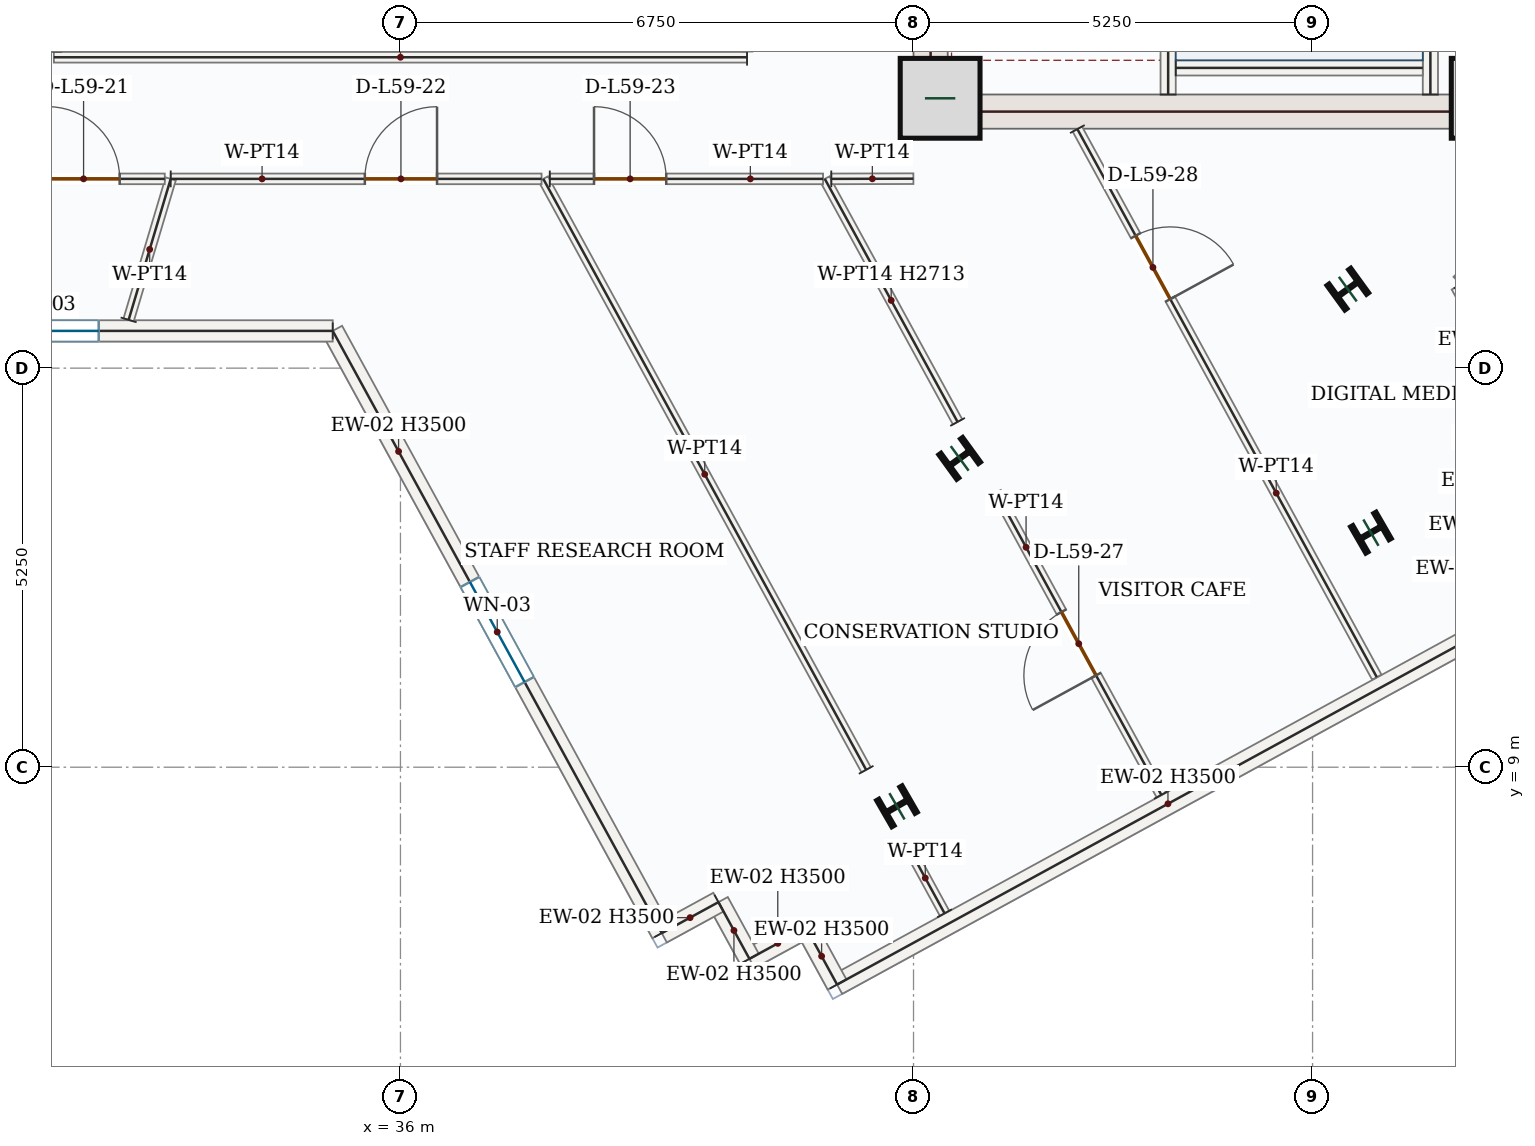
"""IFC4 building model, lengths in metres.
Left out: names, types, materials, properties, quantities, classifications, styles, units other than length and angle.
Written with IfcOpenShell. Run it as: python <this file> out.ifc"""

import sys

from ifc_helpers import new_model, si_unit, direction, frame, frame_2d, origin, origin_2d, place, context, subcontext, project, spatial, rectangle, i_section, extrude, source, transform, mapped, element, fill, save


model = new_model("IFC4")
c1 = context("Model", 3, precision=1e-05, world=origin(), true_north=direction((0.0, 1.0)))
c2 = subcontext(c1, "Body", "Model", "MODEL_VIEW")
j1 = project(units=[si_unit("LENGTHUNIT", "METRE"), si_unit("PLANEANGLEUNIT", "RADIAN")], contexts=[c1])
p1 = place(None, origin())
s1 = spatial("IfcSite", under=j1, at=p1, CompositionType="ELEMENT")
p2 = place(p1, origin())
s2 = spatial("IfcBuilding", under=s1, at=p2, CompositionType="ELEMENT")
p3 = place(p2, frame((0.0, 0.0, 250.35)))
s3 = spatial("IfcBuildingStorey", under=s2, at=p3, CompositionType="ELEMENT", Elevation=250.35)
p4 = place(p3, frame((42.975, 17.4, 0.0), z_axis=(0.0, 0.0, 1.0), x_axis=(0.0, 1.0, 0.0)))
e1 = element("IfcWall", 1, at=p4, inside=s3, PredefinedType="SHEAR", context=c2, shape_type="SweptSolid", body=[
    extrude(rectangle(XDim=8.55, YDim=0.45, at=frame_2d((4.275, 0.0))), origin(), (0.0, 0.0, 1.0), 3.5),
])
p5 = place(p4, frame((6.65, 0.0, 0.0)))
e2 = element("IfcOpeningElement", 2, at=p5, cuts=e1, PredefinedType="OPENING", context=c2, shape_type="SweptSolid", body=[
    extrude(rectangle(XDim=1.1, YDim=2.2, at=frame_2d((0.55, 1.1))), frame((0.0, 0.235, 0.0), z_axis=(0.0, -1.0, 0.0), x_axis=(1.0, 0.0, 0.0)), (0.0, 0.0, 1.0), 0.47),
])
p6 = place(p4, frame((1.75, 0.0, 0.0)))
e3 = element("IfcOpeningElement", 3, at=p6, cuts=e1, PredefinedType="OPENING", context=c2, shape_type="SweptSolid", body=[
    extrude(rectangle(XDim=1.3, YDim=2.2, at=frame_2d((0.65, 1.1))), frame((0.0, 0.235, 0.0), z_axis=(0.0, -1.0, 0.0), x_axis=(1.0, 0.0, 0.0)), (0.0, 0.0, 1.0), 0.47),
])
p7 = place(p4, frame((4.55, 0.0, 0.0)))
e4 = element("IfcOpeningElement", 4, at=p7, cuts=e1, PredefinedType="OPENING", context=c2, shape_type="SweptSolid", body=[
    extrude(rectangle(XDim=0.88, YDim=2.1, at=frame_2d((0.44, 1.05))), frame((0.0, 0.235, 0.0), z_axis=(0.0, -1.0, 0.0), x_axis=(1.0, 0.0, 0.0)), (0.0, 0.0, 1.0), 0.47),
])
m1 = source(origin(), c2, "Body", "SweptSolid", [
    extrude(rectangle(XDim=7.1, YDim=0.45, at=frame_2d((3.55, 0.0))), origin(), (0.0, 0.0, 1.0), 3.5),
])
p8 = place(p3, frame((43.2, 17.625, 0.0), z_axis=(0.0, 0.0, 1.0), x_axis=(1.0, 0.0, 0.0)))
e5 = element("IfcWall", 5, at=p8, inside=s3, PredefinedType="SHEAR", context=c2, shape_type="MappedRepresentation", body=[
    mapped(m1, transform((0.0, 0.0, 0.0), x_axis=(1.0, 0.0, 0.0), y_axis=(0.0, 1.0, 0.0), z_axis=(0.0, 0.0, 1.0), scale=1.0)),
])
m2 = source(origin(), c2, "Body", "SweptSolid", [
    extrude(rectangle(XDim=1.05, YDim=1.05, at=origin_2d()), origin(), (0.0, 0.0, 1.0), 3.75),
])
for number, where, z_axis, x_axis in (
    (6, (43.1, 17.8, 0.0), (0.0, 0.0, 1.0), (1.0, 0.0, 0.0)),
    (7, (50.35, 17.8, 0.0), (0.0, 0.0, 1.0), (1.0, 0.0, 0.0)),
):
    element("IfcColumn", number, at=place(p3, frame(where, z_axis=z_axis, x_axis=x_axis)), inside=s3, PredefinedType="COLUMN", context=c2, shape_type="MappedRepresentation", body=[
        mapped(m2, transform((0.0, 0.0, 0.0), x_axis=(1.0, 0.0, 0.0), y_axis=(0.0, 1.0, 0.0), z_axis=(0.0, 0.0, 1.0), scale=1.0)),
    ])
m3 = source(origin(), c2, "Body", "SweptSolid", [
    extrude(i_section(OverallWidth=0.399, OverallDepth=0.386, WebThickness=0.021, FlangeThickness=0.033, FilletRadius=0.018, at=origin_2d()), origin(), (0.0, 0.0, 1.0), 3.75),
])
for number, where, z_axis, x_axis in (
    (8, (43.357, 13.063, 0.0), (0.0, 0.0, 1.0), (-0.588, 0.809, 0.0)),
    (9, (48.464, 15.289, 0.0), (0.0, 0.0, 1.0), (-0.588, 0.809, 0.0)),
    (10, (42.532, 8.486, 0.0), (0.0, 0.0, 1.0), (-0.5, 0.866, 0.0)),
    (11, (48.768, 12.086, 0.0), (0.0, 0.0, 1.0), (-0.5, 0.866, 0.0)),
):
    element("IfcColumn", number, at=place(p3, frame(where, z_axis=z_axis, x_axis=x_axis)), inside=s3, PredefinedType="COLUMN", context=c2, shape_type="MappedRepresentation", body=[
        mapped(m3, transform((0.0, 0.0, 0.0), x_axis=(1.0, 0.0, 0.0), y_axis=(0.0, 1.0, 0.0), z_axis=(0.0, 0.0, 1.0), scale=1.0)),
    ])
p9 = place(p3, frame((53.06, 18.458, 0.0), z_axis=(0.0, 0.0, 1.0), x_axis=(-0.707106781187, -0.707106781187, 0.0)))
e12 = element("IfcWall", 12, at=p9, inside=s3, PredefinedType="SOLIDWALL", context=c2, shape_type="SweptSolid", body=[
    extrude(rectangle(XDim=4.394, YDim=0.28, at=frame_2d((2.197, 0.0))), origin(), (0.0, 0.0, 1.0), 3.5),
])
p10 = place(p9, frame((1.447, 0.0, 0.85)))
e13 = element("IfcOpeningElement", 13, at=p10, cuts=e12, PredefinedType="OPENING", context=c2, shape_type="SweptSolid", body=[
    extrude(rectangle(XDim=1.5, YDim=1.5, at=frame_2d((0.75, 0.75))), frame((0.0, 0.15, 0.0), z_axis=(0.0, -1.0, 0.0), x_axis=(1.0, 0.0, 0.0)), (0.0, 0.0, 1.0), 0.3),
])
m4 = source(origin(), c2, "Body", "SweptSolid", [
    extrude(rectangle(XDim=2.448, YDim=0.28, at=frame_2d((1.224, 0.0))), origin(), (0.0, 0.0, 1.0), 3.5),
])
p11 = place(p3, frame((49.953, 15.351, 0.0), z_axis=(0.0, 0.0, 1.0), x_axis=(0.47951595933, -0.877533158774, 0.0)))
e14 = element("IfcWall", 14, at=p11, inside=s3, PredefinedType="SOLIDWALL", context=c2, shape_type="MappedRepresentation", body=[
    mapped(m4, transform((0.0, 0.0, 0.0), x_axis=(1.0, 0.0, 0.0), y_axis=(0.0, 1.0, 0.0), z_axis=(0.0, 0.0, 1.0), scale=1.0)),
])
m5 = source(origin(), c2, "Body", "SweptSolid", [
    extrude(rectangle(XDim=9.92, YDim=0.28, at=frame_2d((4.96, 0.0))), origin(), (0.0, 0.0, 1.0), 3.5),
])
p12 = place(p3, frame((50.45, 10.896, 0.0), z_axis=(0.0, 0.0, 1.0), x_axis=(-0.877572768104, -0.479443465574, 0.0)))
e15 = element("IfcWall", 15, at=p12, inside=s3, PredefinedType="SOLIDWALL", context=c2, shape_type="MappedRepresentation", body=[
    mapped(m5, transform((0.0, 0.0, 0.0), x_axis=(1.0, 0.0, 0.0), y_axis=(0.0, 1.0, 0.0), z_axis=(0.0, 0.0, 1.0), scale=1.0)),
])
m6 = source(origin(), c2, "Body", "SweptSolid", [
    extrude(rectangle(XDim=0.85, YDim=0.28, at=frame_2d((0.425, 0.0))), origin(), (0.0, 0.0, 1.0), 3.5),
])
for number, where, z_axis, x_axis in (
    (16, (41.745, 6.14, 0.0), (0.0, 0.0, 1.0), (-0.479, 0.878, 0.0)),
    (17, (41.337, 6.886, 0.0), (0.0, 0.0, 1.0), (-0.878, -0.479, 0.0)),
):
    element("IfcWall", number, at=place(p3, frame(where, z_axis=z_axis, x_axis=x_axis)), inside=s3, PredefinedType="SOLIDWALL", context=c2, shape_type="MappedRepresentation", body=[
        mapped(m6, transform((0.0, 0.0, 0.0), x_axis=(1.0, 0.0, 0.0), y_axis=(0.0, 1.0, 0.0), z_axis=(0.0, 0.0, 1.0), scale=1.0)),
    ])
m7 = source(origin(), c2, "Body", "SweptSolid", [
    extrude(rectangle(XDim=0.85, YDim=0.28, at=frame_2d((0.425, 0.0))), origin(), (0.0, 0.0, 1.0), 3.5),
])
p13 = place(p3, frame((40.591, 6.479, 0.0), z_axis=(0.0, 0.0, 1.0), x_axis=(-0.479656876283, 0.877456141943, 0.0)))
e18 = element("IfcWall", 18, at=p13, inside=s3, PredefinedType="SOLIDWALL", context=c2, shape_type="MappedRepresentation", body=[
    mapped(m7, transform((0.0, 0.0, 0.0), x_axis=(1.0, 0.0, 0.0), y_axis=(0.0, 1.0, 0.0), z_axis=(0.0, 0.0, 1.0), scale=1.0)),
])
p14 = place(p3, frame((40.184, 7.225, 0.0), z_axis=(0.0, 0.0, 1.0), x_axis=(-0.877577015132, -0.479435691737, 0.0)))
e19 = element("IfcWall", 19, at=p14, inside=s3, PredefinedType="SOLIDWALL", context=c2, shape_type="MappedRepresentation", body=[
    mapped(m6, transform((0.0, 0.0, 0.0), x_axis=(1.0, 0.0, 0.0), y_axis=(0.0, 1.0, 0.0), z_axis=(0.0, 0.0, 1.0), scale=1.0)),
])
p15 = place(p3, frame((39.438, 6.817, 0.0), z_axis=(0.0, 0.0, 1.0), x_axis=(-0.479475345647, 0.877555350344, 0.0)))
e20 = element("IfcWall", 20, at=p15, inside=s3, PredefinedType="SOLIDWALL", context=c2, shape_type="SweptSolid", body=[
    extrude(rectangle(XDim=9.028, YDim=0.28, at=frame_2d((4.514, 0.0))), origin(), (0.0, 0.0, 1.0), 3.5),
])
p16 = place(p15, frame((3.764, 0.0, 0.85)))
e21 = element("IfcOpeningElement", 21, at=p16, cuts=e20, PredefinedType="OPENING", context=c2, shape_type="SweptSolid", body=[
    extrude(rectangle(XDim=1.5, YDim=1.5, at=frame_2d((0.75, 0.75))), frame((0.0, 0.15, 0.0), z_axis=(0.0, -1.0, 0.0), x_axis=(1.0, 0.0, 0.0)), (0.0, 0.0, 1.0), 0.3),
])
p17 = place(p3, frame((35.109, 14.74, 0.0), z_axis=(0.0, 0.0, 1.0), x_axis=(-1.0, 0.0, 0.0)))
e22 = element("IfcWall", 22, at=p17, inside=s3, PredefinedType="SOLIDWALL", context=c2, shape_type="SweptSolid", body=[
    extrude(rectangle(XDim=7.658, YDim=0.28, at=frame_2d((3.829, 0.0))), origin(), (0.0, 0.0, 1.0), 2.772),
])
p18 = place(p17, frame((3.079, 0.0, 0.85)))
e23 = element("IfcOpeningElement", 23, at=p18, cuts=e22, PredefinedType="OPENING", context=c2, shape_type="SweptSolid", body=[
    extrude(rectangle(XDim=1.5, YDim=1.5, at=frame_2d((0.75, 0.75))), frame((0.0, 0.15, 0.0), z_axis=(0.0, -1.0, 0.0), x_axis=(1.0, 0.0, 0.0)), (0.0, 0.0, 1.0), 0.3),
])
m8 = source(origin(), c2, "Body", "SweptSolid", [
    extrude(rectangle(XDim=7.87, YDim=0.2, at=frame_2d((3.935, 0.0))), origin(), (0.0, 0.0, 1.0), 3.5),
])
p19 = place(p3, frame((49.55, 17.85, 0.0), z_axis=(0.0, 0.0, 1.0), x_axis=(0.0, 1.0, 0.0)))
e24 = element("IfcWall", 24, at=p19, inside=s3, PredefinedType="SOLIDWALL", context=c2, shape_type="MappedRepresentation", body=[
    mapped(m8, transform((0.0, 0.0, 0.0), x_axis=(1.0, 0.0, 0.0), y_axis=(0.0, 1.0, 0.0), z_axis=(0.0, 0.0, 1.0), scale=1.0)),
])
p20 = place(p3, frame((46.1, 17.85, 0.0), z_axis=(0.0, 0.0, 1.0), x_axis=(0.0, 1.0, 0.0)))
e25 = element("IfcWall", 25, at=p20, inside=s3, PredefinedType="SOLIDWALL", context=c2, shape_type="SweptSolid", body=[
    extrude(rectangle(XDim=8.0, YDim=0.2, at=frame_2d((4.0, 0.0))), origin(), (0.0, 0.0, 1.0), 3.5),
])
p21 = place(p20, frame((6.3, 0.0, 0.0)))
e26 = element("IfcOpeningElement", 26, at=p21, cuts=e25, PredefinedType="OPENING", context=c2, shape_type="SweptSolid", body=[
    extrude(rectangle(XDim=1.05, YDim=2.15, at=frame_2d((0.525, 1.075))), frame((0.0, 0.11, 0.0), z_axis=(0.0, -1.0, 0.0), x_axis=(1.0, 0.0, 0.0)), (0.0, 0.0, 1.0), 0.22),
])
m9 = source(origin(), c2, "Body", "SweptSolid", [
    extrude(rectangle(XDim=3.25, YDim=0.2, at=frame_2d((1.625, 0.0))), origin(), (0.0, 0.0, 1.0), 3.5),
])
p22 = place(p3, frame((46.2, 18.2, 0.0), z_axis=(0.0, 0.0, 1.0), x_axis=(1.0, 0.0, 0.0)))
e27 = element("IfcWall", 27, at=p22, inside=s3, PredefinedType="SOLIDWALL", context=c2, shape_type="MappedRepresentation", body=[
    mapped(m9, transform((0.0, 0.0, 0.0), x_axis=(1.0, 0.0, 0.0), y_axis=(0.0, 1.0, 0.0), z_axis=(0.0, 0.0, 1.0), scale=1.0)),
])
p23 = place(p3, frame((44.906, 17.395, 0.0), z_axis=(0.0, 0.0, 1.0), x_axis=(0.479449534835, -0.877569452264, 0.0)))
e28 = element("IfcWall", 28, at=p23, inside=s3, PredefinedType="PARTITIONING", context=c2, shape_type="SweptSolid", body=[
    extrude(rectangle(XDim=8.216, YDim=0.14, at=frame_2d((4.108, 0.0))), origin(), (0.0, 0.0, 1.0), 3.5),
])
p24 = place(p23, frame((1.599, 0.0, 0.0)))
e29 = element("IfcOpeningElement", 29, at=p24, cuts=e28, PredefinedType="OPENING", context=c2, shape_type="SweptSolid", body=[
    extrude(rectangle(XDim=0.95, YDim=2.15, at=frame_2d((0.475, 1.075))), frame((0.0, 0.08, 0.0), z_axis=(0.0, -1.0, 0.0), x_axis=(1.0, 0.0, 0.0)), (0.0, 0.0, 1.0), 0.16),
])
p25 = place(p3, frame((46.01, 8.636, 0.0), z_axis=(0.0, 0.0, 1.0), x_axis=(-0.479410597023, 0.877590724348, 0.0)))
e30 = element("IfcWall", 30, at=p25, inside=s3, PredefinedType="PARTITIONING", context=c2, shape_type="SweptSolid", body=[
    extrude(rectangle(XDim=4.532, YDim=0.14, at=frame_2d((2.266, 0.0))), origin(), (0.0, 0.0, 1.0), 3.5),
])
p26 = place(p25, frame((1.791, 0.0, 0.0)))
e31 = element("IfcOpeningElement", 31, at=p26, cuts=e30, PredefinedType="OPENING", context=c2, shape_type="SweptSolid", body=[
    extrude(rectangle(XDim=0.95, YDim=2.15, at=frame_2d((0.475, 1.075))), frame((0.0, 0.08, 0.0), z_axis=(0.0, -1.0, 0.0), x_axis=(1.0, 0.0, 0.0)), (0.0, 0.0, 1.0), 0.16),
])
m10 = source(origin(), c2, "Body", "SweptSolid", [
    extrude(rectangle(XDim=3.643, YDim=0.14, at=frame_2d((1.822, 0.0))), origin(), (0.0, 0.0, 1.0), 2.713),
])
p27 = place(p3, frame((43.33, 13.543, 0.0), z_axis=(0.0, 0.0, 1.0), x_axis=(-0.479434255723, 0.87757779965, 0.0)))
e32 = element("IfcWall", 32, at=p27, inside=s3, PredefinedType="PARTITIONING", context=c2, shape_type="MappedRepresentation", body=[
    mapped(m10, transform((0.0, 0.0, 0.0), x_axis=(1.0, 0.0, 0.0), y_axis=(0.0, 1.0, 0.0), z_axis=(0.0, 0.0, 1.0), scale=1.0)),
])
m11 = source(origin(), c2, "Body", "SweptSolid", [
    extrude(rectangle(XDim=1.08, YDim=0.14, at=frame_2d((0.54, 0.0))), origin(), (0.0, 0.0, 1.0), 3.5),
])
p28 = place(p3, frame((41.668, 16.74, 0.0), z_axis=(0.0, 0.0, 1.0), x_axis=(0.999996908828, 0.002486429927, 0.0)))
e33 = element("IfcWall", 33, at=p28, inside=s3, PredefinedType="PARTITIONING", context=c2, shape_type="MappedRepresentation", body=[
    mapped(m11, transform((0.0, 0.0, 0.0), x_axis=(1.0, 0.0, 0.0), y_axis=(0.0, 1.0, 0.0), z_axis=(0.0, 0.0, 1.0), scale=1.0)),
])
m12 = source(origin(), c2, "Body", "SweptSolid", [
    extrude(rectangle(XDim=8.859, YDim=0.14, at=frame_2d((4.429, 0.0))), origin(), (0.0, 0.0, 1.0), 3.5),
])
p29 = place(p3, frame((42.127, 8.966, 0.0), z_axis=(0.0, 0.0, 1.0), x_axis=(-0.479448669569, 0.877569924991, 0.0)))
e34 = element("IfcWall", 34, at=p29, inside=s3, PredefinedType="PARTITIONING", context=c2, shape_type="MappedRepresentation", body=[
    mapped(m12, transform((0.0, 0.0, 0.0), x_axis=(1.0, 0.0, 0.0), y_axis=(0.0, 1.0, 0.0), z_axis=(0.0, 0.0, 1.0), scale=1.0)),
])
p30 = place(p3, frame((37.965, 16.74, 0.0), z_axis=(0.0, 0.0, 1.0), x_axis=(1.0, 0.0, 0.0)))
e35 = element("IfcWall", 35, at=p30, inside=s3, PredefinedType="PARTITIONING", context=c2, shape_type="SweptSolid", body=[
    extrude(rectangle(XDim=3.595, YDim=0.14, at=frame_2d((1.798, 0.0))), origin(), (0.0, 0.0, 1.0), 3.5),
])
p31 = place(p30, frame((0.582, 0.0, 0.0)))
e36 = element("IfcOpeningElement", 36, at=p31, cuts=e35, PredefinedType="OPENING", context=c2, shape_type="SweptSolid", body=[
    extrude(rectangle(XDim=0.95, YDim=2.15, at=frame_2d((0.475, 1.075))), frame((0.0, 0.08, 0.0), z_axis=(0.0, -1.0, 0.0), x_axis=(1.0, 0.0, 0.0)), (0.0, 0.0, 1.0), 0.16),
])
m13 = source(origin(), c2, "Body", "SweptSolid", [
    extrude(rectangle(XDim=1.057, YDim=0.14, at=frame_2d((0.529, 0.0))), origin(), (0.0, 0.0, 1.0), 3.5),
])
p32 = place(p3, frame((43.158, 7.078, 0.0), z_axis=(0.0, 0.0, 1.0), x_axis=(-0.479434527366, 0.877577651248, 0.0)))
e37 = element("IfcWall", 37, at=p32, inside=s3, PredefinedType="PARTITIONING", context=c2, shape_type="MappedRepresentation", body=[
    mapped(m13, transform((0.0, 0.0, 0.0), x_axis=(1.0, 0.0, 0.0), y_axis=(0.0, 1.0, 0.0), z_axis=(0.0, 0.0, 1.0), scale=1.0)),
])
p33 = place(p3, frame((32.978, 16.74, 0.0), z_axis=(0.0, 0.0, 1.0), x_axis=(1.0, 0.0, 0.0)))
e38 = element("IfcWall", 38, at=p33, inside=s3, PredefinedType="PARTITIONING", context=c2, shape_type="SweptSolid", body=[
    extrude(rectangle(XDim=4.879, YDim=0.14, at=frame_2d((2.439, 0.0))), origin(), (0.0, 0.0, 1.0), 3.5),
])
p34 = place(p33, frame((2.554, 0.0, 0.0)))
e39 = element("IfcOpeningElement", 39, at=p34, cuts=e38, PredefinedType="OPENING", context=c2, shape_type="SweptSolid", body=[
    extrude(rectangle(XDim=0.95, YDim=2.15, at=frame_2d((0.475, 1.075))), frame((0.0, 0.08, 0.0), z_axis=(0.0, -1.0, 0.0), x_axis=(1.0, 0.0, 0.0)), (0.0, 0.0, 1.0), 0.16),
])
m14 = source(origin(), c2, "Body", "SweptSolid", [
    extrude(rectangle(XDim=1.936, YDim=0.14, at=frame_2d((0.968, 0.0))), origin(), (0.0, 0.0, 1.0), 3.5),
])
p35 = place(p3, frame((32.424, 14.885, 0.0), z_axis=(0.0, 0.0, 1.0), x_axis=(0.286028613148, 0.958221077028, 0.0)))
e40 = element("IfcWall", 40, at=p35, inside=s3, PredefinedType="PARTITIONING", context=c2, shape_type="MappedRepresentation", body=[
    mapped(m14, transform((0.0, 0.0, 0.0), x_axis=(1.0, 0.0, 0.0), y_axis=(0.0, 1.0, 0.0), z_axis=(0.0, 0.0, 1.0), scale=1.0)),
])
p36 = place(p3, frame((29.253, 16.741, 0.0), z_axis=(0.0, 0.0, 1.0), x_axis=(0.999999943952, -0.000334806463, 0.0)))
e41 = element("IfcWall", 41, at=p36, inside=s3, PredefinedType="PARTITIONING", context=c2, shape_type="SweptSolid", body=[
    extrude(rectangle(XDim=3.646, YDim=0.14, at=frame_2d((1.823, 0.0))), origin(), (0.0, 0.0, 1.0), 3.5),
])
p37 = place(p36, frame((2.103, 0.0, 0.0)))
e42 = element("IfcOpeningElement", 42, at=p37, cuts=e41, PredefinedType="OPENING", context=c2, shape_type="SweptSolid", body=[
    extrude(rectangle(XDim=0.95, YDim=2.15, at=frame_2d((0.475, 1.075))), frame((0.0, 0.08, 0.0), z_axis=(0.0, -1.0, 0.0), x_axis=(1.0, 0.0, 0.0)), (0.0, 0.0, 1.0), 0.16),
])
m15 = source(origin(), c2, "Body", "SweptSolid", [
    extrude(rectangle(XDim=9.12, YDim=0.14, at=frame_2d((4.56, 0.0))), origin(), (0.0, 0.0, 1.0), 3.5),
])
p38 = place(p3, frame((40.56, 18.34, 0.0), z_axis=(0.0, 0.0, 1.0), x_axis=(-1.0, 0.0, 0.0)))
e43 = element("IfcWall", 43, at=p38, inside=s3, PredefinedType="PARTITIONING", context=c2, shape_type="MappedRepresentation", body=[
    mapped(m15, transform((0.0, 0.0, 0.0), x_axis=(1.0, 0.0, 0.0), y_axis=(0.0, 1.0, 0.0), z_axis=(0.0, 0.0, 1.0), scale=1.0)),
])
m16 = source(origin(), c2, "Body", "SweptSolid", [
    extrude(rectangle(XDim=1.5, YDim=1.5, at=frame_2d((0.75, 0.75))), frame((0.0, 0.03, 0.0), z_axis=(0.0, -1.0, 0.0), x_axis=(1.0, 0.0, 0.0)), (0.0, 0.0, 1.0), 0.06),
])
p39 = place(p16, origin())
e44 = element("IfcWindow", 44, at=p39, inside=s3, PartitioningType="SINGLE_PANEL", PredefinedType="WINDOW", context=c2, shape_type="MappedRepresentation", body=[
    mapped(m16, transform((0.0, 0.0, 0.0), x_axis=(1.0, 0.0, 0.0), y_axis=(0.0, 1.0, 0.0), z_axis=(0.0, 0.0, 1.0), scale=1.0)),
])
fill(e21, e44)
p40 = place(p18, origin())
e45 = element("IfcWindow", 45, at=p40, inside=s3, PartitioningType="SINGLE_PANEL", PredefinedType="WINDOW", context=c2, shape_type="MappedRepresentation", body=[
    mapped(m16, transform((0.0, 0.0, 0.0), x_axis=(1.0, 0.0, 0.0), y_axis=(0.0, 1.0, 0.0), z_axis=(0.0, 0.0, 1.0), scale=1.0)),
])
fill(e23, e45)
m17 = source(origin(), c2, "Body", "SweptSolid", [
    extrude(rectangle(XDim=0.95, YDim=2.15, at=frame_2d((0.475, 1.075))), frame((0.0, 0.025, 0.0), z_axis=(0.0, -1.0, 0.0), x_axis=(1.0, 0.0, 0.0)), (0.0, 0.0, 1.0), 0.05),
])
p41 = place(p37, origin())
e46 = element("IfcDoor", 46, at=p41, inside=s3, OperationType="SINGLE_SWING_LEFT", PredefinedType="DOOR", context=c2, shape_type="MappedRepresentation", body=[
    mapped(m17, transform((0.0, 0.0, 0.0), x_axis=(1.0, 0.0, 0.0), y_axis=(0.0, 1.0, 0.0), z_axis=(0.0, 0.0, 1.0), scale=1.0)),
])
fill(e42, e46)
p42 = place(p34, origin())
e47 = element("IfcDoor", 47, at=p42, inside=s3, OperationType="SINGLE_SWING_RIGHT", PredefinedType="DOOR", context=c2, shape_type="MappedRepresentation", body=[
    mapped(m17, transform((0.0, 0.0, 0.0), x_axis=(1.0, 0.0, 0.0), y_axis=(0.0, 1.0, 0.0), z_axis=(0.0, 0.0, 1.0), scale=1.0)),
])
fill(e39, e47)
p43 = place(p31, origin())
e48 = element("IfcDoor", 48, at=p43, inside=s3, OperationType="SINGLE_SWING_LEFT", PredefinedType="DOOR", context=c2, shape_type="MappedRepresentation", body=[
    mapped(m17, transform((0.0, 0.0, 0.0), x_axis=(1.0, 0.0, 0.0), y_axis=(0.0, 1.0, 0.0), z_axis=(0.0, 0.0, 1.0), scale=1.0)),
])
fill(e36, e48)
p44 = place(p26, origin())
e49 = element("IfcDoor", 49, at=p44, inside=s3, OperationType="SINGLE_SWING_LEFT", PredefinedType="DOOR", context=c2, shape_type="MappedRepresentation", body=[
    mapped(m17, transform((0.0, 0.0, 0.0), x_axis=(1.0, 0.0, 0.0), y_axis=(0.0, 1.0, 0.0), z_axis=(0.0, 0.0, 1.0), scale=1.0)),
])
fill(e31, e49)
p45 = place(p24, origin())
e50 = element("IfcDoor", 50, at=p45, inside=s3, OperationType="SINGLE_SWING_RIGHT", PredefinedType="DOOR", context=c2, shape_type="MappedRepresentation", body=[
    mapped(m17, transform((0.0, 0.0, 0.0), x_axis=(1.0, 0.0, 0.0), y_axis=(0.0, 1.0, 0.0), z_axis=(0.0, 0.0, 1.0), scale=1.0)),
])
fill(e29, e50)
save(model, sys.argv[1])
